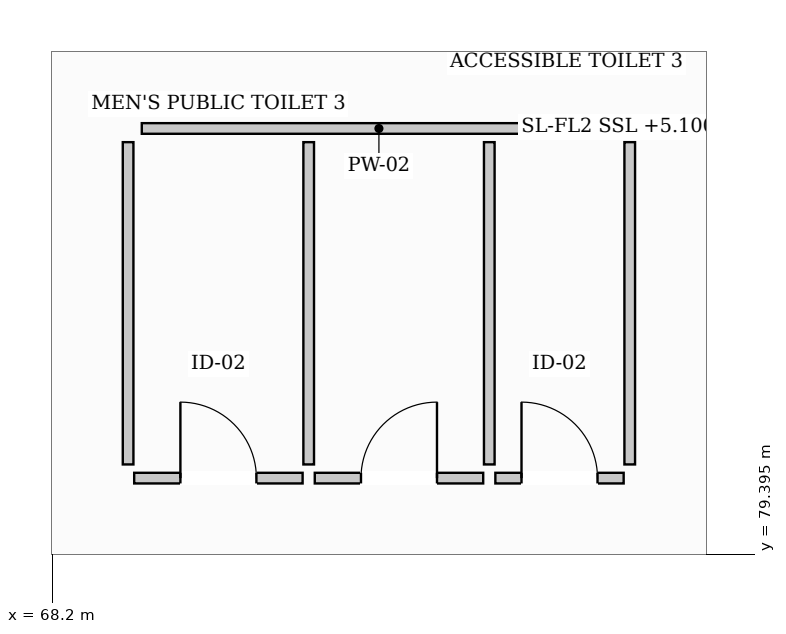
"""IFC4 building model, lengths in metres.
Left out: names, types, materials, properties, quantities, classifications, styles, units other than length and angle.
Written with IfcOpenShell. Run it as: python <this file> out.ifc"""

import sys

from ifc_helpers import new_model, si_unit, direction, frame, frame_2d, origin, place, context, subcontext, project, spatial, rectangle, extrude, element, fill, save


model = new_model("IFC4")
c1 = context("Model", 3, precision=1e-05, world=origin(), true_north=direction((0.0, 1.0)))
c2 = subcontext(c1, "Body", "Model", "MODEL_VIEW")
j1 = project(units=[si_unit("LENGTHUNIT", "METRE"), si_unit("PLANEANGLEUNIT", "RADIAN")], contexts=[c1])
p1 = place(None, origin())
s1 = spatial("IfcSite", under=j1, at=p1, CompositionType="ELEMENT")
p2 = place(p1, origin())
s2 = spatial("IfcBuilding", under=s1, at=p2, CompositionType="ELEMENT")
p3 = place(p2, frame((0.0, 0.0, 5.1)))
s3 = spatial("IfcBuildingStorey", under=s2, at=p3, CompositionType="ELEMENT", Elevation=5.1)
p4 = place(p3, frame((69.38, 85.0, 0.0), z_axis=(0.0, 0.0, 1.0), x_axis=(1.0, 0.0, 0.0)))
e1 = element("IfcWall", 1, at=p4, inside=s3, PredefinedType="PARTITIONING", context=c2, shape_type="SweptSolid", body=[
    extrude(rectangle(XDim=6.24, YDim=0.14, at=frame_2d((3.12, 0.0))), origin(), (0.0, 0.0, 1.0), 3.96),
])
for number, where, z_axis, x_axis in (
    (2, (69.2, 80.58, 0.0), (0.0, 0.0, 1.0), (0.0, 1.0, 0.0)),
    (3, (75.8, 80.58, 0.0), (0.0, 0.0, 1.0), (0.0, 1.0, 0.0)),
    (4, (71.576, 80.58, 0.0), (0.0, 0.0, 1.0), (0.0, 1.0, 0.0)),
    (5, (73.952, 80.58, 0.0), (0.0, 0.0, 1.0), (0.0, 1.0, 0.0)),
):
    element("IfcWall", number, at=place(p3, frame(where, z_axis=z_axis, x_axis=x_axis)), inside=s3, PredefinedType="PARTITIONING", context=c2, shape_type="SweptSolid", body=[
        extrude(rectangle(XDim=4.24, YDim=0.14, at=frame_2d((2.12, 0.0))), origin(), (0.0, 0.0, 1.0), 4.18),
    ])
p5 = place(p3, frame((69.28, 80.4, 0.0), z_axis=(0.0, 0.0, 1.0), x_axis=(1.0, 0.0, 0.0)))
e6 = element("IfcWall", 6, at=p5, inside=s3, PredefinedType="PARTITIONING", context=c2, shape_type="SweptSolid", body=[
    extrude(rectangle(XDim=2.216, YDim=0.14, at=frame_2d((1.108, 0.0))), origin(), (0.0, 0.0, 1.0), 4.18),
])
p6 = place(p5, frame((0.608, 0.0, 0.0)))
e7 = element("IfcOpeningElement", 7, at=p6, cuts=e6, PredefinedType="OPENING", context=c2, shape_type="SweptSolid", body=[
    extrude(rectangle(XDim=1.0, YDim=2.15, at=frame_2d((0.5, 1.075))), frame((0.0, 0.08, 0.0), z_axis=(0.0, -1.0, 0.0), x_axis=(1.0, 0.0, 0.0)), (0.0, 0.0, 1.0), 0.16),
])
p7 = place(p3, frame((71.656, 80.4, 0.0), z_axis=(0.0, 0.0, 1.0), x_axis=(1.0, 0.0, 0.0)))
e8 = element("IfcWall", 8, at=p7, inside=s3, PredefinedType="PARTITIONING", context=c2, shape_type="SweptSolid", body=[
    extrude(rectangle(XDim=2.216, YDim=0.14, at=frame_2d((1.108, 0.0))), origin(), (0.0, 0.0, 1.0), 3.96),
])
p8 = place(p7, frame((0.608, 0.0, 0.0)))
e9 = element("IfcOpeningElement", 9, at=p8, cuts=e8, PredefinedType="OPENING", context=c2, shape_type="SweptSolid", body=[
    extrude(rectangle(XDim=1.0, YDim=2.15, at=frame_2d((0.5, 1.075))), frame((0.0, 0.08, 0.0), z_axis=(0.0, -1.0, 0.0), x_axis=(1.0, 0.0, 0.0)), (0.0, 0.0, 1.0), 0.16),
])
p9 = place(p3, frame((74.032, 80.4, 0.0), z_axis=(0.0, 0.0, 1.0), x_axis=(1.0, 0.0, 0.0)))
e10 = element("IfcWall", 10, at=p9, inside=s3, PredefinedType="PARTITIONING", context=c2, shape_type="SweptSolid", body=[
    extrude(rectangle(XDim=1.688, YDim=0.14, at=frame_2d((0.844, 0.0))), origin(), (0.0, 0.0, 1.0), 4.18),
])
p10 = place(p9, frame((0.344, 0.0, 0.0)))
e11 = element("IfcOpeningElement", 11, at=p10, cuts=e10, PredefinedType="OPENING", context=c2, shape_type="SweptSolid", body=[
    extrude(rectangle(XDim=1.0, YDim=2.15, at=frame_2d((0.5, 1.075))), frame((0.0, 0.08, 0.0), z_axis=(0.0, -1.0, 0.0), x_axis=(1.0, 0.0, 0.0)), (0.0, 0.0, 1.0), 0.16),
])
p11 = place(p6, origin())
e12 = element("IfcDoor", 12, at=p11, inside=s3, OperationType="SINGLE_SWING_LEFT", PredefinedType="DOOR", context=c2, shape_type="SweptSolid", body=[
    extrude(rectangle(XDim=1.0, YDim=2.15, at=frame_2d((0.5, 1.075))), frame((0.0, 0.025, 0.0), z_axis=(0.0, -1.0, 0.0), x_axis=(1.0, 0.0, 0.0)), (0.0, 0.0, 1.0), 0.05),
])
fill(e7, e12)
p12 = place(p8, origin())
e13 = element("IfcDoor", 13, at=p12, inside=s3, OperationType="SINGLE_SWING_RIGHT", PredefinedType="DOOR", context=c2, shape_type="SweptSolid", body=[
    extrude(rectangle(XDim=1.0, YDim=2.15, at=frame_2d((0.5, 1.075))), frame((0.0, 0.025, 0.0), z_axis=(0.0, -1.0, 0.0), x_axis=(1.0, 0.0, 0.0)), (0.0, 0.0, 1.0), 0.05),
])
fill(e9, e13)
p13 = place(p10, origin())
e14 = element("IfcDoor", 14, at=p13, inside=s3, OperationType="SINGLE_SWING_LEFT", PredefinedType="DOOR", context=c2, shape_type="SweptSolid", body=[
    extrude(rectangle(XDim=1.0, YDim=2.15, at=frame_2d((0.5, 1.075))), frame((0.0, 0.025, 0.0), z_axis=(0.0, -1.0, 0.0), x_axis=(1.0, 0.0, 0.0)), (0.0, 0.0, 1.0), 0.05),
])
fill(e11, e14)
save(model, sys.argv[1])
